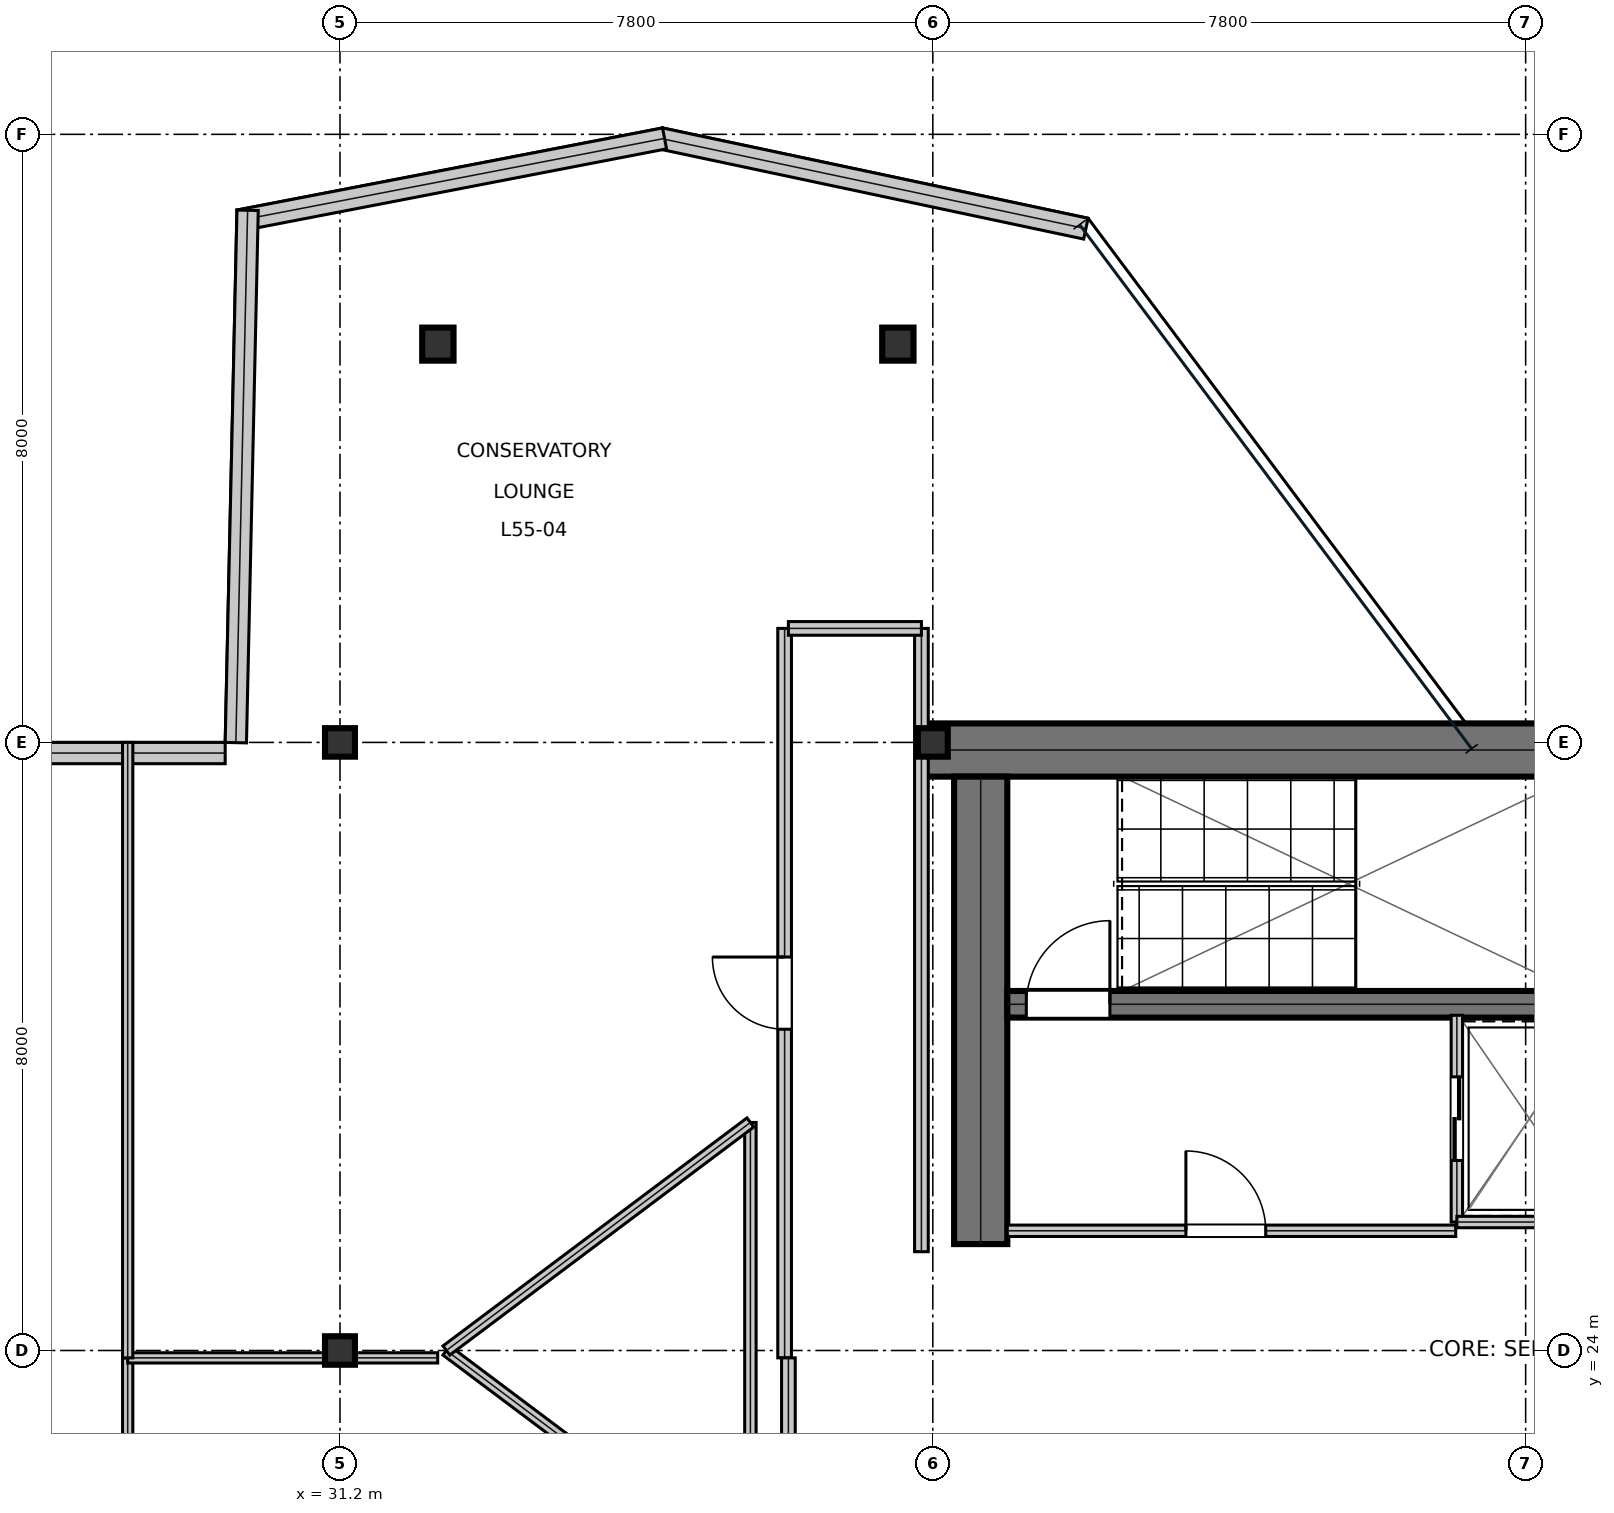
"""IFC4 building model, lengths in metres.
Left out: names, types, materials, properties, quantities, classifications, styles, units other than length and angle.
Written with IfcOpenShell. Run it as: python <this file> out.ifc"""

import sys

from ifc_helpers import new_model, si_unit, direction, frame, frame_2d, origin, origin_2d, place, context, subcontext, project, spatial, rectangle, i_section, extrude, element, fill, save


model = new_model("IFC4")
c1 = context("Model", 3, precision=1e-05, world=origin(), true_north=direction((0.0, 1.0)))
c2 = subcontext(c1, "Body", "Model", "MODEL_VIEW")
j1 = project(units=[si_unit("LENGTHUNIT", "METRE"), si_unit("PLANEANGLEUNIT", "RADIAN")], contexts=[c1])
p1 = place(None, origin())
s1 = spatial("IfcSite", under=j1, at=p1, CompositionType="ELEMENT")
p2 = place(p1, origin())
s2 = spatial("IfcBuilding", under=s1, at=p2, CompositionType="ELEMENT")
p3 = place(p2, frame((0.0, 0.0, 236.4)))
s3 = spatial("IfcBuildingStorey", under=s2, at=p3, CompositionType="ELEMENT", Elevation=236.4)
p4 = place(p3, frame((38.8, 31.9, 0.0), z_axis=(0.0, 0.0, 1.0), x_axis=(1.0, 0.0, 0.0)))
e1 = element("IfcWall", 1, at=p4, inside=s3, PredefinedType="SHEAR", context=c2, shape_type="SweptSolid", body=[
    extrude(rectangle(XDim=16.0, YDim=0.7, at=frame_2d((8.0, 0.0))), origin(), (0.0, 0.0, 1.0), 3.79),
])
p5 = place(p3, frame((39.63, 25.4, 0.0), z_axis=(0.0, 0.0, 1.0), x_axis=(0.0, 1.0, 0.0)))
e2 = element("IfcWall", 2, at=p5, inside=s3, PredefinedType="SHEAR", context=c2, shape_type="SweptSolid", body=[
    extrude(rectangle(XDim=6.15, YDim=0.7, at=frame_2d((3.075, 0.0))), origin(), (0.0, 0.0, 1.0), 3.79),
])
p6 = place(p3, frame((39.98, 28.555, 0.0), z_axis=(0.0, 0.0, 1.0), x_axis=(1.0, 0.0, 0.0)))
e3 = element("IfcWall", 3, at=p6, inside=s3, PredefinedType="SHEAR", context=c2, shape_type="SweptSolid", body=[
    extrude(rectangle(XDim=7.71, YDim=0.35, at=frame_2d((3.855, 0.0))), origin(), (0.0, 0.0, 1.0), 3.79),
])
p7 = place(p6, frame((0.25, 0.0, 0.0)))
e4 = element("IfcOpeningElement", 4, at=p7, cuts=e3, PredefinedType="OPENING", context=c2, shape_type="SweptSolid", body=[
    extrude(rectangle(XDim=1.1, YDim=2.15, at=frame_2d((0.55, 1.075))), frame((0.0, 0.185, 0.0), z_axis=(0.0, -1.0, 0.0), x_axis=(1.0, 0.0, 0.0)), (0.0, 0.0, 1.0), 0.37),
])
for number, where, z_axis, x_axis in (
    (5, (31.2, 24.0, 0.0), (0.0, 0.0, 1.0), (1.0, 0.0, 0.0)),
    (6, (31.2, 32.0, 0.0), (0.0, 0.0, 1.0), (1.0, 0.0, 0.0)),
    (7, (39.0, 32.0, 0.0), (0.0, 0.0, 1.0), (1.0, 0.0, 0.0)),
):
    element("IfcColumn", number, at=place(p3, frame(where, z_axis=z_axis, x_axis=x_axis)), inside=s3, PredefinedType="COLUMN", context=c2, shape_type="SweptSolid", body=[
        extrude(i_section(OverallWidth=0.394, OverallDepth=0.375, WebThickness=0.017, FlangeThickness=0.028, at=origin_2d()), origin(), (0.0, 0.0, 1.0), 4.044),
    ])
p8 = place(p3, frame((32.488, 37.24, 0.016), z_axis=(0.003463243796, -0.00747331556, 0.999966077173), x_axis=(0.907310606534, 0.420461012784, 0.0)))
e8 = element("IfcColumn", 8, at=p8, inside=s3, PredefinedType="COLUMN", context=c2, shape_type="SweptSolid", body=[
    extrude(i_section(OverallWidth=0.412, OverallDepth=0.435, WebThickness=0.036, FlangeThickness=0.058, at=origin_2d()), origin(), (0.0, 0.0, 1.0), 4.018),
])
p9 = place(p3, frame((38.54, 37.24, 0.016), z_axis=(-0.001275938538, -0.007473354295, 0.999971260065), x_axis=(0.98573642551, -0.168296462892, 0.0)))
e9 = element("IfcColumn", 9, at=p9, inside=s3, PredefinedType="COLUMN", context=c2, shape_type="SweptSolid", body=[
    extrude(i_section(OverallWidth=0.412, OverallDepth=0.435, WebThickness=0.036, FlangeThickness=0.058, at=origin_2d()), origin(), (0.0, 0.0, 1.0), 4.018),
])
p10 = place(p3, frame((41.014, 38.759, 0.0), z_axis=(0.0, 0.0, 1.0), x_axis=(-0.978225466403, 0.207545023742, 0.0)))
e10 = element("IfcWall", 10, at=p10, inside=s3, PredefinedType="STANDARD", context=c2, shape_type="SweptSolid", body=[
    extrude(rectangle(XDim=5.724, YDim=0.28, at=frame_2d((2.862, 0.0))), origin(), (0.0, 0.0, 1.0), 3.79),
])
p11 = place(p3, frame((35.47, 39.947, 0.0), z_axis=(0.0, 0.0, 1.0), x_axis=(-0.981898182051, -0.18940950368, 0.0)))
e11 = element("IfcWall", 11, at=p11, inside=s3, PredefinedType="STANDARD", context=c2, shape_type="SweptSolid", body=[
    extrude(rectangle(XDim=5.702, YDim=0.28, at=frame_2d((2.851, 0.0))), origin(), (0.0, 0.0, 1.0), 3.79),
])
p12 = place(p3, frame((29.985, 39.001, 0.0), z_axis=(0.0, 0.0, 1.0), x_axis=(-0.022163330023, -0.999754363232, 0.0)))
e12 = element("IfcWall", 12, at=p12, inside=s3, PredefinedType="STANDARD", context=c2, shape_type="SweptSolid", body=[
    extrude(rectangle(XDim=7.006, YDim=0.28, at=frame_2d((3.503, 0.0))), origin(), (0.0, 0.0, 1.0), 3.79),
])
p13 = place(p3, frame((29.69, 31.86, 0.0), z_axis=(0.0, 0.0, 1.0), x_axis=(-1.0, 0.0, 0.0)))
e13 = element("IfcWall", 13, at=p13, inside=s3, PredefinedType="STANDARD", context=c2, shape_type="SweptSolid", body=[
    extrude(rectangle(XDim=2.818, YDim=0.28, at=frame_2d((1.409, 0.0))), origin(), (0.0, 0.0, 1.0), 3.79),
])
p14 = place(p3, frame((39.98, 25.575, 0.0), z_axis=(0.0, 0.0, 1.0), x_axis=(1.0, 0.0, 0.0)))
e14 = element("IfcWall", 14, at=p14, inside=s3, PredefinedType="PARTITIONING", context=c2, shape_type="SweptSolid", body=[
    extrude(rectangle(XDim=5.9, YDim=0.15, at=frame_2d((2.95, 0.0))), origin(), (0.0, 0.0, 1.0), 3.79),
])
p15 = place(p14, frame((2.35, 0.0, 0.0)))
e15 = element("IfcOpeningElement", 15, at=p15, cuts=e14, PredefinedType="OPENING", context=c2, shape_type="SweptSolid", body=[
    extrude(rectangle(XDim=1.05, YDim=2.15, at=frame_2d((0.525, 1.075))), frame((0.0, 0.085, 0.0), z_axis=(0.0, -1.0, 0.0), x_axis=(1.0, 0.0, 0.0)), (0.0, 0.0, 1.0), 0.17),
])
p16 = place(p3, frame((45.895, 25.69, 0.0), z_axis=(0.0, 0.0, 1.0), x_axis=(0.0, 1.0, 0.0)))
e16 = element("IfcWall", 16, at=p16, inside=s3, PredefinedType="PARTITIONING", context=c2, shape_type="SweptSolid", body=[
    extrude(rectangle(XDim=2.72, YDim=0.15, at=frame_2d((1.36, 0.0))), origin(), (0.0, 0.0, 1.0), 3.79),
])
p17 = place(p16, frame((0.81, 0.0, 0.0)))
e17 = element("IfcOpeningElement", 17, at=p17, cuts=e16, PredefinedType="OPENING", context=c2, shape_type="SweptSolid", body=[
    extrude(rectangle(XDim=1.1, YDim=2.15, at=frame_2d((0.55, 1.075))), frame((0.0, 0.085, 0.0), z_axis=(0.0, -1.0, 0.0), x_axis=(1.0, 0.0, 0.0)), (0.0, 0.0, 1.0), 0.17),
])
p18 = place(p3, frame((45.895, 25.69, 0.0), z_axis=(0.0, 0.0, 1.0), x_axis=(1.0, 0.0, 0.0)))
e18 = element("IfcWall", 18, at=p18, inside=s3, PredefinedType="PARTITIONING", context=c2, shape_type="SweptSolid", body=[
    extrude(rectangle(XDim=1.915, YDim=0.15, at=frame_2d((0.958, 0.0))), origin(), (0.0, 0.0, 1.0), 3.79),
])
p19 = place(p3, frame((37.05, 23.903, 0.0), z_axis=(0.0, 0.0, 1.0), x_axis=(0.0, 1.0, 0.0)))
e19 = element("IfcWall", 19, at=p19, inside=s3, PredefinedType="SOLIDWALL", context=c2, shape_type="SweptSolid", body=[
    extrude(rectangle(XDim=9.597, YDim=0.18, at=frame_2d((4.798, 0.0))), origin(), (0.0, 0.0, 1.0), 3.241),
])
p20 = place(p19, frame((4.323, 0.0, 0.0)))
e20 = element("IfcOpeningElement", 20, at=p20, cuts=e19, PredefinedType="OPENING", context=c2, shape_type="SweptSolid", body=[
    extrude(rectangle(XDim=0.95, YDim=2.15, at=frame_2d((0.475, 1.075))), frame((0.0, 0.1, 0.0), z_axis=(0.0, -1.0, 0.0), x_axis=(1.0, 0.0, 0.0)), (0.0, 0.0, 1.0), 0.2),
])
p21 = place(p3, frame((37.1, 20.6, 0.0), z_axis=(0.0, 0.0, 1.0), x_axis=(0.0, 1.0, 0.0)))
e21 = element("IfcWall", 21, at=p21, inside=s3, PredefinedType="SOLIDWALL", context=c2, shape_type="SweptSolid", body=[
    extrude(rectangle(XDim=3.303, YDim=0.18, at=frame_2d((1.651, 0.0))), origin(), (0.0, 0.0, 1.0), 3.79),
])
p22 = place(p3, frame((38.85, 25.3, 0.0), z_axis=(0.0, 0.0, 1.0), x_axis=(0.0, 1.0, 0.0)))
e22 = element("IfcWall", 22, at=p22, inside=s3, PredefinedType="SOLIDWALL", context=c2, shape_type="SweptSolid", body=[
    extrude(rectangle(XDim=8.2, YDim=0.18, at=frame_2d((4.1, 0.0))), origin(), (0.0, 0.0, 1.0), 3.241),
])
p23 = place(p3, frame((37.1, 33.5, 0.0), z_axis=(0.0, 0.0, 1.0), x_axis=(1.0, 0.0, 0.0)))
e23 = element("IfcWall", 23, at=p23, inside=s3, PredefinedType="SOLIDWALL", context=c2, shape_type="SweptSolid", body=[
    extrude(rectangle(XDim=1.75, YDim=0.18, at=frame_2d((0.875, 0.0))), origin(), (0.0, 0.0, 1.0), 3.241),
])
p24 = place(p3, frame((28.407, 20.6, 0.0), z_axis=(0.0, 0.0, 1.0), x_axis=(0.0, 1.0, 0.0)))
e24 = element("IfcWall", 24, at=p24, inside=s3, PredefinedType="PARTITIONING", context=c2, shape_type="SweptSolid", body=[
    extrude(rectangle(XDim=3.303, YDim=0.135, at=frame_2d((1.651, 0.0))), origin(), (0.0, 0.0, 1.0), 3.241),
])
p25 = place(p3, frame((28.407, 23.903, 0.0), z_axis=(0.0, 0.0, 1.0), x_axis=(1.0, 0.0, 0.0)))
e25 = element("IfcWall", 25, at=p25, inside=s3, PredefinedType="PARTITIONING", context=c2, shape_type="SweptSolid", body=[
    extrude(rectangle(XDim=4.079, YDim=0.135, at=frame_2d((2.04, 0.0))), origin(), (0.0, 0.0, 1.0), 3.241),
])
p26 = place(p3, frame((28.407, 23.903, 0.0), z_axis=(0.0, 0.0, 1.0), x_axis=(0.0, 1.0, 0.0)))
e26 = element("IfcWall", 26, at=p26, inside=s3, PredefinedType="PARTITIONING", context=c2, shape_type="SweptSolid", body=[
    extrude(rectangle(XDim=8.097, YDim=0.135, at=frame_2d((4.048, 0.0))), origin(), (0.0, 0.0, 1.0), 3.241),
])
p27 = place(p3, frame((32.6, 24.0, 0.0), z_axis=(0.0, 0.0, 1.0), x_axis=(0.8, -0.6, 0.0)))
e27 = element("IfcWall", 27, at=p27, inside=s3, PredefinedType="MOVABLE", context=c2, shape_type="SweptSolid", body=[
    extrude(rectangle(XDim=5.0, YDim=0.15, at=frame_2d((2.5, 0.0))), origin(), (0.0, 0.0, 1.0), 3.79),
])
p28 = place(p3, frame((36.6, 21.0, 0.0), z_axis=(0.0, 0.0, 1.0), x_axis=(0.0, 1.0, 0.0)))
e28 = element("IfcWall", 28, at=p28, inside=s3, PredefinedType="MOVABLE", context=c2, shape_type="SweptSolid", body=[
    extrude(rectangle(XDim=6.0, YDim=0.15, at=frame_2d((3.0, 0.0))), origin(), (0.0, 0.0, 1.0), 3.79),
])
p29 = place(p3, frame((36.6, 27.0, 0.0), z_axis=(0.0, 0.0, 1.0), x_axis=(-0.8, -0.6, 0.0)))
e29 = element("IfcWall", 29, at=p29, inside=s3, PredefinedType="MOVABLE", context=c2, shape_type="SweptSolid", body=[
    extrude(rectangle(XDim=5.0, YDim=0.15, at=frame_2d((2.5, 0.0))), origin(), (0.0, 0.0, 1.0), 3.79),
])
p30 = place(p15, origin())
e30 = element("IfcDoor", 30, at=p30, inside=s3, OperationType="SINGLE_SWING_LEFT", PredefinedType="DOOR", context=c2, shape_type="SweptSolid", body=[
    extrude(rectangle(XDim=1.05, YDim=2.15, at=frame_2d((0.525, 1.075))), frame((0.0, 0.025, 0.0), z_axis=(0.0, -1.0, 0.0), x_axis=(1.0, 0.0, 0.0)), (0.0, 0.0, 1.0), 0.05),
])
fill(e15, e30)
p31 = place(p17, frame((1.1, 0.0, 0.0), z_axis=(0.0, 0.0, 1.0), x_axis=(-1.0, 0.0, 0.0)))
e31 = element("IfcDoor", 31, at=p31, inside=s3, OperationType="DOUBLE_DOOR_SLIDING", PredefinedType="DOOR", context=c2, shape_type="SweptSolid", body=[
    extrude(rectangle(XDim=1.1, YDim=2.15, at=frame_2d((0.55, 1.075))), frame((0.0, 0.025, 0.0), z_axis=(0.0, -1.0, 0.0), x_axis=(1.0, 0.0, 0.0)), (0.0, 0.0, 1.0), 0.05),
])
fill(e17, e31)
p32 = place(p20, origin())
e32 = element("IfcDoor", 32, at=p32, inside=s3, OperationType="SINGLE_SWING_RIGHT", PredefinedType="DOOR", context=c2, shape_type="SweptSolid", body=[
    extrude(rectangle(XDim=0.95, YDim=2.15, at=frame_2d((0.475, 1.075))), frame((0.0, 0.025, 0.0), z_axis=(0.0, -1.0, 0.0), x_axis=(1.0, 0.0, 0.0)), (0.0, 0.0, 1.0), 0.05),
])
fill(e20, e32)
p33 = place(p7, origin())
e33 = element("IfcDoor", 33, at=p33, inside=s3, OperationType="SINGLE_SWING_RIGHT", PredefinedType="DOOR", context=c2, shape_type="SweptSolid", body=[
    extrude(rectangle(XDim=1.1, YDim=2.15, at=frame_2d((0.55, 1.075))), frame((0.0, 0.025, 0.0), z_axis=(0.0, -1.0, 0.0), x_axis=(1.0, 0.0, 0.0)), (0.0, 0.0, 1.0), 0.05),
])
fill(e4, e33)
save(model, sys.argv[1])
